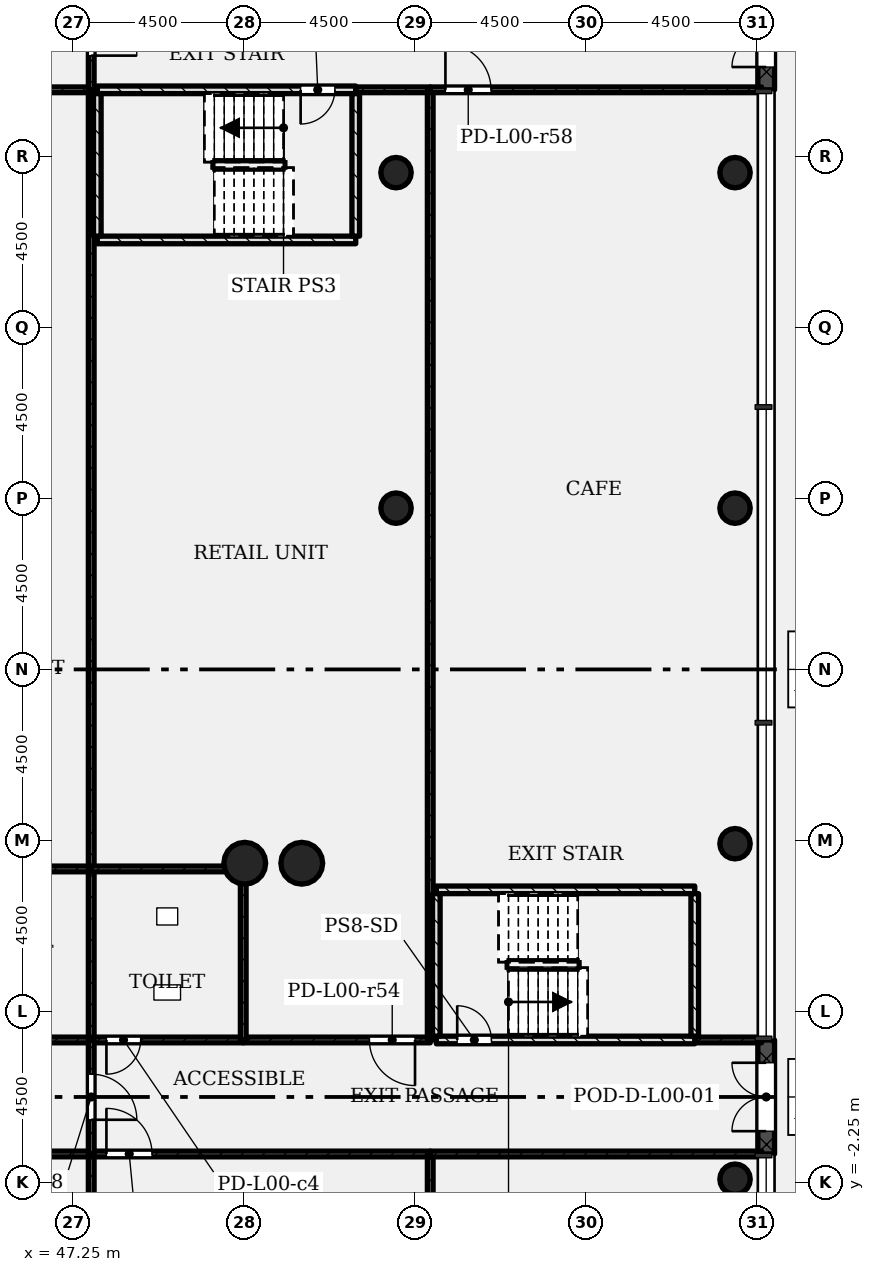
"""IFC4 building model, lengths in metres.
Left out: names, types, materials, properties, quantities, classifications, styles, units other than length and angle.
Written with IfcOpenShell. Run it as: python <this file> out.ifc"""

import sys

from ifc_helpers import new_model, si_unit, direction, frame, frame_2d, origin, origin_2d, place, context, subcontext, project, spatial, rectangle, hollow_circle, extrude, element, fill, save


model = new_model("IFC4")
c1 = context("Model", 3, precision=1e-05, world=origin(), true_north=direction((0.0, 1.0)))
c2 = subcontext(c1, "Body", "Model", "MODEL_VIEW")
j1 = project(units=[si_unit("LENGTHUNIT", "METRE"), si_unit("PLANEANGLEUNIT", "RADIAN")], contexts=[c1])
p1 = place(None, origin())
s1 = spatial("IfcSite", under=j1, at=p1, CompositionType="ELEMENT")
p2 = place(p1, origin())
s2 = spatial("IfcBuilding", under=s1, at=p2, CompositionType="ELEMENT")
p3 = place(p2, origin())
s3 = spatial("IfcBuildingStorey", under=s2, at=p3, CompositionType="ELEMENT", Elevation=0.0)
for number, where, z_axis, x_axis in (
    (1, (51.75, 6.15, -0.4), (0.0, 0.0, 1.0), (1.0, 0.0, 0.0)),
    (2, (53.25, 6.15, -0.4), (0.0, 0.0, 1.0), (1.0, 0.0, 0.0)),
):
    element("IfcColumn", number, at=place(p3, frame(where, z_axis=z_axis, x_axis=x_axis)), inside=s3, PredefinedType="COLUMN", context=c2, shape_type="SweptSolid", body=[
        extrude(hollow_circle(Radius=0.55, WallThickness=0.04, at=origin_2d()), origin(), (0.0, 0.0, 1.0), 6.4),
    ])
for number, where, z_axis, x_axis in (
    (3, (64.65, -2.164, -0.4), (0.0, 0.0, 1.0), (1.0, 0.0, 0.0)),
    (4, (64.65, 6.664, -0.4), (0.0, 0.0, 1.0), (1.0, 0.0, 0.0)),
    (5, (55.73, 15.493, -0.4), (0.0, 0.0, 1.0), (1.0, 0.0, 0.0)),
    (6, (64.65, 15.493, -0.4), (0.0, 0.0, 1.0), (1.0, 0.0, 0.0)),
    (7, (55.73, 24.321, -0.4), (0.0, 0.0, 1.0), (1.0, 0.0, 0.0)),
    (8, (64.65, 24.321, -0.4), (0.0, 0.0, 1.0), (1.0, 0.0, 0.0)),
):
    element("IfcColumn", number, at=place(p3, frame(where, z_axis=z_axis, x_axis=x_axis)), inside=s3, PredefinedType="COLUMN", context=c2, shape_type="SweptSolid", body=[
        extrude(hollow_circle(Radius=0.4, WallThickness=0.028, at=origin_2d()), origin(), (0.0, 0.0, 1.0), 6.4),
    ])
p4 = place(p3, frame((65.47, -1.5, 0.0), z_axis=(0.0, 0.0, 1.0), x_axis=(0.0, 1.0, 0.0)))
e9 = element("IfcWall", 9, at=p4, inside=s3, PredefinedType="STANDARD", context=c2, shape_type="SweptSolid", body=[
    extrude(rectangle(XDim=3.0, YDim=0.44, at=frame_2d((1.5, 0.0))), origin(), (0.0, 0.0, 1.0), 5.7),
])
p5 = place(p4, frame((0.6, 0.0, 0.0)))
e10 = element("IfcOpeningElement", 10, at=p5, cuts=e9, PredefinedType="OPENING", context=c2, shape_type="SweptSolid", body=[
    extrude(rectangle(XDim=1.8, YDim=2.1, at=frame_2d((0.9, 1.05))), frame((0.0, 0.23, 0.0), z_axis=(0.0, -1.0, 0.0), x_axis=(1.0, 0.0, 0.0)), (0.0, 0.0, 1.0), 0.46),
])
p6 = place(p3, frame((65.47, 26.5, 0.0), z_axis=(0.0, 0.0, 1.0), x_axis=(0.0, 1.0, 0.0)))
e11 = element("IfcWall", 11, at=p6, inside=s3, PredefinedType="STANDARD", context=c2, shape_type="SweptSolid", body=[
    extrude(rectangle(XDim=3.0, YDim=0.44, at=frame_2d((1.5, 0.0))), origin(), (0.0, 0.0, 1.0), 5.7),
])
p7 = place(p6, frame((0.6, 0.0, 0.0)))
e12 = element("IfcOpeningElement", 12, at=p7, cuts=e11, PredefinedType="OPENING", context=c2, shape_type="SweptSolid", body=[
    extrude(rectangle(XDim=1.8, YDim=2.1, at=frame_2d((0.9, 1.05))), frame((0.0, 0.23, 0.0), z_axis=(0.0, -1.0, 0.0), x_axis=(1.0, 0.0, 0.0)), (0.0, 0.0, 1.0), 0.46),
])
p8 = place(p3, frame((38.79, 26.5, 0.0), z_axis=(0.0, 0.0, 1.0), x_axis=(1.0, 0.0, 0.0)))
e13 = element("IfcWall", 13, at=p8, inside=s3, PredefinedType="PARTITIONING", context=c2, shape_type="SweptSolid", body=[
    extrude(rectangle(XDim=8.92, YDim=0.15, at=frame_2d((4.46, 0.0))), origin(), (0.0, 0.0, 1.0), 5.58),
])
p9 = place(p8, frame((0.4, 0.0, 0.0)))
e14 = element("IfcOpeningElement", 14, at=p9, cuts=e13, PredefinedType="OPENING", context=c2, shape_type="SweptSolid", body=[
    extrude(rectangle(XDim=1.2, YDim=2.1, at=frame_2d((0.6, 1.05))), frame((0.0, 0.085, 0.0), z_axis=(0.0, -1.0, 0.0), x_axis=(1.0, 0.0, 0.0)), (0.0, 0.0, 1.0), 0.17),
])
p10 = place(p3, frame((47.71, 26.5, 0.0), z_axis=(0.0, 0.0, 1.0), x_axis=(0.0, -1.0, 0.0)))
e15 = element("IfcWall", 15, at=p10, inside=s3, PredefinedType="PARTITIONING", context=c2, shape_type="SweptSolid", body=[
    extrude(rectangle(XDim=20.5, YDim=0.15, at=frame_2d((10.25, 0.0))), origin(), (0.0, 0.0, 1.0), 5.58),
])
p11 = place(p3, frame((42.75, -1.5, 0.0), z_axis=(0.0, 0.0, 1.0), x_axis=(1.0, 0.0, 0.0)))
e16 = element("IfcWall", 16, at=p11, inside=s3, PredefinedType="PARTITIONING", context=c2, shape_type="SweptSolid", body=[
    extrude(rectangle(XDim=4.96, YDim=0.15, at=frame_2d((2.48, 0.0))), origin(), (0.0, 0.0, 1.0), 5.58),
])
p12 = place(p3, frame((47.71, -1.5, 0.0), z_axis=(0.0, 0.0, 1.0), x_axis=(0.0, -1.0, 0.0)))
e17 = element("IfcWall", 17, at=p12, inside=s3, PredefinedType="PARTITIONING", context=c2, shape_type="SweptSolid", body=[
    extrude(rectangle(XDim=22.0, YDim=0.15, at=frame_2d((11.0, 0.0))), origin(), (0.0, 0.0, 1.0), 5.58),
])
p13 = place(p3, frame((47.71, -1.5, 0.0), z_axis=(0.0, 0.0, 1.0), x_axis=(1.0, 0.0, 0.0)))
e18 = element("IfcWall", 18, at=p13, inside=s3, PredefinedType="PARTITIONING", context=c2, shape_type="SweptSolid", body=[
    extrude(rectangle(XDim=8.92, YDim=0.15, at=frame_2d((4.46, 0.0))), origin(), (0.0, 0.0, 1.0), 5.58),
])
p14 = place(p13, frame((0.4, 0.0, 0.0)))
e19 = element("IfcOpeningElement", 19, at=p14, cuts=e18, PredefinedType="OPENING", context=c2, shape_type="SweptSolid", body=[
    extrude(rectangle(XDim=1.2, YDim=2.1, at=frame_2d((0.6, 1.05))), frame((0.0, 0.085, 0.0), z_axis=(0.0, -1.0, 0.0), x_axis=(1.0, 0.0, 0.0)), (0.0, 0.0, 1.0), 0.17),
])
p15 = place(p3, frame((56.63, -1.5, 0.0), z_axis=(0.0, 0.0, 1.0), x_axis=(0.0, -1.0, 0.0)))
e20 = element("IfcWall", 20, at=p15, inside=s3, PredefinedType="PARTITIONING", context=c2, shape_type="SweptSolid", body=[
    extrude(rectangle(XDim=22.0, YDim=0.15, at=frame_2d((11.0, 0.0))), origin(), (0.0, 0.0, 1.0), 5.58),
])
p16 = place(p3, frame((54.67, 26.5, 0.0), z_axis=(0.0, 0.0, 1.0), x_axis=(1.0, 0.0, 0.0)))
e21 = element("IfcWall", 21, at=p16, inside=s3, PredefinedType="PARTITIONING", context=c2, shape_type="SweptSolid", body=[
    extrude(rectangle(XDim=1.96, YDim=0.15, at=frame_2d((0.98, 0.0))), origin(), (0.0, 0.0, 1.0), 5.58),
])
p17 = place(p3, frame((56.63, 1.5, 0.0), z_axis=(0.0, 0.0, 1.0), x_axis=(-1.0, 0.0, 0.0)))
e22 = element("IfcWall", 22, at=p17, inside=s3, PredefinedType="PARTITIONING", context=c2, shape_type="SweptSolid", body=[
    extrude(rectangle(XDim=4.92, YDim=0.15, at=frame_2d((2.46, 0.0))), origin(), (0.0, 0.0, 1.0), 5.58),
])
p18 = place(p17, frame((0.4, 0.0, 0.0)))
e23 = element("IfcOpeningElement", 23, at=p18, cuts=e22, PredefinedType="OPENING", context=c2, shape_type="SweptSolid", body=[
    extrude(rectangle(XDim=1.2, YDim=2.1, at=frame_2d((0.6, 1.05))), frame((0.0, 0.085, 0.0), z_axis=(0.0, -1.0, 0.0), x_axis=(1.0, 0.0, 0.0)), (0.0, 0.0, 1.0), 0.17),
])
p19 = place(p3, frame((56.63, 26.5, 0.0), z_axis=(0.0, 0.0, 1.0), x_axis=(0.0, -1.0, 0.0)))
e24 = element("IfcWall", 24, at=p19, inside=s3, PredefinedType="PARTITIONING", context=c2, shape_type="SweptSolid", body=[
    extrude(rectangle(XDim=25.0, YDim=0.15, at=frame_2d((12.5, 0.0))), origin(), (0.0, 0.0, 1.0), 5.58),
])
p20 = place(p3, frame((56.63, -1.5, 0.0), z_axis=(0.0, 0.0, 1.0), x_axis=(1.0, 0.0, 0.0)))
e25 = element("IfcWall", 25, at=p20, inside=s3, PredefinedType="PARTITIONING", context=c2, shape_type="SweptSolid", body=[
    extrude(rectangle(XDim=8.72, YDim=0.15, at=frame_2d((4.36, 0.0))), origin(), (0.0, 0.0, 1.0), 5.58),
])
p21 = place(p3, frame((56.63, 26.5, 0.0), z_axis=(0.0, 0.0, 1.0), x_axis=(1.0, 0.0, 0.0)))
e26 = element("IfcWall", 26, at=p21, inside=s3, PredefinedType="PARTITIONING", context=c2, shape_type="SweptSolid", body=[
    extrude(rectangle(XDim=8.72, YDim=0.15, at=frame_2d((4.36, 0.0))), origin(), (0.0, 0.0, 1.0), 5.58),
])
p22 = place(p21, frame((0.4, 0.0, 0.0)))
e27 = element("IfcOpeningElement", 27, at=p22, cuts=e26, PredefinedType="OPENING", context=c2, shape_type="SweptSolid", body=[
    extrude(rectangle(XDim=1.2, YDim=2.1, at=frame_2d((0.6, 1.05))), frame((0.0, 0.085, 0.0), z_axis=(0.0, -1.0, 0.0), x_axis=(1.0, 0.0, 0.0)), (0.0, 0.0, 1.0), 0.17),
])
p23 = place(p3, frame((65.35, 1.5, 0.0), z_axis=(0.0, 0.0, 1.0), x_axis=(-1.0, 0.0, 0.0)))
e28 = element("IfcWall", 28, at=p23, inside=s3, PredefinedType="PARTITIONING", context=c2, shape_type="SweptSolid", body=[
    extrude(rectangle(XDim=1.76, YDim=0.15, at=frame_2d((0.88, 0.0))), origin(), (0.0, 0.0, 1.0), 5.58),
])
p24 = place(p3, frame((43.71, 1.5, 0.0), z_axis=(0.0, 0.0, 1.0), x_axis=(1.0, 0.0, 0.0)))
e29 = element("IfcWall", 29, at=p24, inside=s3, PredefinedType="PARTITIONING", context=c2, shape_type="SweptSolid", body=[
    extrude(rectangle(XDim=4.0, YDim=0.15, at=frame_2d((2.0, 0.0))), origin(), (0.0, 0.0, 1.0), 5.58),
])
p25 = place(p24, frame((0.4, 0.0, 0.0)))
e30 = element("IfcOpeningElement", 30, at=p25, cuts=e29, PredefinedType="OPENING", context=c2, shape_type="SweptSolid", body=[
    extrude(rectangle(XDim=0.9, YDim=2.1, at=frame_2d((0.45, 1.05))), frame((0.0, 0.085, 0.0), z_axis=(0.0, -1.0, 0.0), x_axis=(1.0, 0.0, 0.0)), (0.0, 0.0, 1.0), 0.17),
])
p26 = place(p3, frame((47.71, 6.0, 0.0), z_axis=(0.0, 0.0, 1.0), x_axis=(-1.0, 0.0, 0.0)))
e31 = element("IfcWall", 31, at=p26, inside=s3, PredefinedType="PARTITIONING", context=c2, shape_type="SweptSolid", body=[
    extrude(rectangle(XDim=4.0, YDim=0.15, at=frame_2d((2.0, 0.0))), origin(), (0.0, 0.0, 1.0), 5.58),
])
p27 = place(p3, frame((47.71, 1.5, 0.0), z_axis=(0.0, 0.0, 1.0), x_axis=(0.0, 1.0, 0.0)))
e32 = element("IfcWall", 32, at=p27, inside=s3, PredefinedType="PARTITIONING", context=c2, shape_type="SweptSolid", body=[
    extrude(rectangle(XDim=4.5, YDim=0.15, at=frame_2d((2.25, 0.0))), origin(), (0.0, 0.0, 1.0), 5.58),
])
p28 = place(p3, frame((47.71, 1.5, 0.0), z_axis=(0.0, 0.0, 1.0), x_axis=(1.0, 0.0, 0.0)))
e33 = element("IfcWall", 33, at=p28, inside=s3, PredefinedType="PARTITIONING", context=c2, shape_type="SweptSolid", body=[
    extrude(rectangle(XDim=4.0, YDim=0.15, at=frame_2d((2.0, 0.0))), origin(), (0.0, 0.0, 1.0), 5.58),
])
p29 = place(p28, frame((0.4, 0.0, 0.0)))
e34 = element("IfcOpeningElement", 34, at=p29, cuts=e33, PredefinedType="OPENING", context=c2, shape_type="SweptSolid", body=[
    extrude(rectangle(XDim=0.9, YDim=2.1, at=frame_2d((0.45, 1.05))), frame((0.0, 0.085, 0.0), z_axis=(0.0, -1.0, 0.0), x_axis=(1.0, 0.0, 0.0)), (0.0, 0.0, 1.0), 0.17),
])
p30 = place(p3, frame((51.71, 1.5, 0.0), z_axis=(0.0, 0.0, 1.0), x_axis=(0.0, 1.0, 0.0)))
e35 = element("IfcWall", 35, at=p30, inside=s3, PredefinedType="PARTITIONING", context=c2, shape_type="SweptSolid", body=[
    extrude(rectangle(XDim=4.5, YDim=0.15, at=frame_2d((2.25, 0.0))), origin(), (0.0, 0.0, 1.0), 5.58),
])
p31 = place(p3, frame((51.71, 6.0, 0.0), z_axis=(0.0, 0.0, 1.0), x_axis=(-1.0, 0.0, 0.0)))
e36 = element("IfcWall", 36, at=p31, inside=s3, PredefinedType="PARTITIONING", context=c2, shape_type="SweptSolid", body=[
    extrude(rectangle(XDim=4.0, YDim=0.15, at=frame_2d((2.0, 0.0))), origin(), (0.0, 0.0, 1.0), 5.58),
])
p32 = place(p3, frame((47.71, 26.5, 0.0), z_axis=(0.0, 0.0, 1.0), x_axis=(0.0, 1.0, 0.0)))
e37 = element("IfcWall", 37, at=p32, inside=s3, PredefinedType="PARTITIONING", context=c2, shape_type="SweptSolid", body=[
    extrude(rectangle(XDim=3.0, YDim=0.15, at=frame_2d((1.5, 0.0))), origin(), (0.0, 0.0, 1.0), 5.58),
])
p33 = place(p32, frame((0.9, 0.0, 0.0)))
e38 = element("IfcOpeningElement", 38, at=p33, cuts=e37, PredefinedType="OPENING", context=c2, shape_type="SweptSolid", body=[
    extrude(rectangle(XDim=1.2, YDim=2.1, at=frame_2d((0.6, 1.05))), frame((0.0, 0.085, 0.0), z_axis=(0.0, -1.0, 0.0), x_axis=(1.0, 0.0, 0.0)), (0.0, 0.0, 1.0), 0.17),
])
p34 = place(p3, frame((47.71, -1.5, 0.0), z_axis=(0.0, 0.0, 1.0), x_axis=(0.0, 1.0, 0.0)))
e39 = element("IfcWall", 39, at=p34, inside=s3, PredefinedType="PARTITIONING", context=c2, shape_type="SweptSolid", body=[
    extrude(rectangle(XDim=3.0, YDim=0.15, at=frame_2d((1.5, 0.0))), origin(), (0.0, 0.0, 1.0), 5.58),
])
p35 = place(p34, frame((0.9, 0.0, 0.0)))
e40 = element("IfcOpeningElement", 40, at=p35, cuts=e39, PredefinedType="OPENING", context=c2, shape_type="SweptSolid", body=[
    extrude(rectangle(XDim=1.2, YDim=2.1, at=frame_2d((0.6, 1.05))), frame((0.0, 0.085, 0.0), z_axis=(0.0, -1.0, 0.0), x_axis=(1.0, 0.0, 0.0)), (0.0, 0.0, 1.0), 0.17),
])
p36 = place(p3, frame((47.87, 26.5, 0.0), z_axis=(0.0, 0.0, 1.0), x_axis=(1.0, 0.0, 0.0)))
e41 = element("IfcWall", 41, at=p36, inside=s3, PredefinedType="SHEAR", context=c2, shape_type="SweptSolid", body=[
    extrude(rectangle(XDim=6.8, YDim=0.2, at=frame_2d((3.4, 0.0))), origin(), (0.0, 0.0, 1.0), 5.58),
])
p37 = place(p36, frame((5.35, 0.0, 0.0)))
e42 = element("IfcOpeningElement", 42, at=p37, cuts=e41, PredefinedType="OPENING", context=c2, shape_type="SweptSolid", body=[
    extrude(rectangle(XDim=0.9, YDim=2.1, at=frame_2d((0.45, 1.05))), frame((0.0, 0.11, 0.0), z_axis=(0.0, -1.0, 0.0), x_axis=(1.0, 0.0, 0.0)), (0.0, 0.0, 1.0), 0.22),
])
p38 = place(p3, frame((47.87, 22.55, 0.0), z_axis=(0.0, 0.0, 1.0), x_axis=(1.0, 0.0, 0.0)))
e43 = element("IfcWall", 43, at=p38, inside=s3, PredefinedType="SHEAR", context=c2, shape_type="SweptSolid", body=[
    extrude(rectangle(XDim=6.8, YDim=0.2, at=frame_2d((3.4, 0.0))), origin(), (0.0, 0.0, 1.0), 5.58),
])
for number, where, z_axis, x_axis in (
    (44, (47.87, 22.65, 0.0), (0.0, 0.0, 1.0), (0.0, 1.0, 0.0)),
    (45, (54.67, 22.65, 0.0), (0.0, 0.0, 1.0), (0.0, 1.0, 0.0)),
):
    element("IfcWall", number, at=place(p3, frame(where, z_axis=z_axis, x_axis=x_axis)), inside=s3, PredefinedType="SHEAR", context=c2, shape_type="SweptSolid", body=[
        extrude(rectangle(XDim=3.75, YDim=0.2, at=frame_2d((1.875, 0.0))), origin(), (0.0, 0.0, 1.0), 5.58),
    ])
p39 = place(p3, frame((56.79, 1.5, 0.0), z_axis=(0.0, 0.0, 1.0), x_axis=(1.0, 0.0, 0.0)))
e46 = element("IfcWall", 46, at=p39, inside=s3, PredefinedType="SHEAR", context=c2, shape_type="SweptSolid", body=[
    extrude(rectangle(XDim=6.8, YDim=0.2, at=frame_2d((3.4, 0.0))), origin(), (0.0, 0.0, 1.0), 5.58),
])
p40 = place(p39, frame((0.55, 0.0, 0.0)))
e47 = element("IfcOpeningElement", 47, at=p40, cuts=e46, PredefinedType="OPENING", context=c2, shape_type="SweptSolid", body=[
    extrude(rectangle(XDim=0.9, YDim=2.1, at=frame_2d((0.45, 1.05))), frame((0.0, 0.11, 0.0), z_axis=(0.0, -1.0, 0.0), x_axis=(1.0, 0.0, 0.0)), (0.0, 0.0, 1.0), 0.22),
])
p41 = place(p3, frame((56.79, 5.45, 0.0), z_axis=(0.0, 0.0, 1.0), x_axis=(1.0, 0.0, 0.0)))
e48 = element("IfcWall", 48, at=p41, inside=s3, PredefinedType="SHEAR", context=c2, shape_type="SweptSolid", body=[
    extrude(rectangle(XDim=6.8, YDim=0.2, at=frame_2d((3.4, 0.0))), origin(), (0.0, 0.0, 1.0), 5.58),
])
for number, where, z_axis, x_axis in (
    (49, (56.79, 1.6, 0.0), (0.0, 0.0, 1.0), (0.0, 1.0, 0.0)),
    (50, (63.59, 1.6, 0.0), (0.0, 0.0, 1.0), (0.0, 1.0, 0.0)),
):
    element("IfcWall", number, at=place(p3, frame(where, z_axis=z_axis, x_axis=x_axis)), inside=s3, PredefinedType="SHEAR", context=c2, shape_type="SweptSolid", body=[
        extrude(rectangle(XDim=3.75, YDim=0.2, at=frame_2d((1.875, 0.0))), origin(), (0.0, 0.0, 1.0), 5.58),
    ])
p42 = place(p5, origin())
e51 = element("IfcDoor", 51, at=p42, inside=s3, OperationType="DOUBLE_DOOR_DOUBLE_SWING", PredefinedType="DOOR", context=c2, shape_type="SweptSolid", body=[
    extrude(rectangle(XDim=1.8, YDim=2.1, at=frame_2d((0.9, 1.05))), frame((0.0, 0.025, 0.0), z_axis=(0.0, -1.0, 0.0), x_axis=(1.0, 0.0, 0.0)), (0.0, 0.0, 1.0), 0.05),
])
fill(e10, e51)
p43 = place(p7, origin())
e52 = element("IfcDoor", 52, at=p43, inside=s3, OperationType="DOUBLE_DOOR_DOUBLE_SWING", PredefinedType="DOOR", context=c2, shape_type="SweptSolid", body=[
    extrude(rectangle(XDim=1.8, YDim=2.1, at=frame_2d((0.9, 1.05))), frame((0.0, 0.025, 0.0), z_axis=(0.0, -1.0, 0.0), x_axis=(1.0, 0.0, 0.0)), (0.0, 0.0, 1.0), 0.05),
])
fill(e12, e52)
p44 = place(p14, origin())
e53 = element("IfcDoor", 53, at=p44, inside=s3, OperationType="SINGLE_SWING_RIGHT", PredefinedType="DOOR", context=c2, shape_type="SweptSolid", body=[
    extrude(rectangle(XDim=1.2, YDim=2.1, at=frame_2d((0.6, 1.05))), frame((0.0, 0.025, 0.0), z_axis=(0.0, -1.0, 0.0), x_axis=(1.0, 0.0, 0.0)), (0.0, 0.0, 1.0), 0.05),
])
fill(e19, e53)
p45 = place(p18, origin())
e54 = element("IfcDoor", 54, at=p45, inside=s3, OperationType="SINGLE_SWING_RIGHT", PredefinedType="DOOR", context=c2, shape_type="SweptSolid", body=[
    extrude(rectangle(XDim=1.2, YDim=2.1, at=frame_2d((0.6, 1.05))), frame((0.0, 0.025, 0.0), z_axis=(0.0, -1.0, 0.0), x_axis=(1.0, 0.0, 0.0)), (0.0, 0.0, 1.0), 0.05),
])
fill(e23, e54)
p46 = place(p22, origin())
e55 = element("IfcDoor", 55, at=p46, inside=s3, OperationType="SINGLE_SWING_RIGHT", PredefinedType="DOOR", context=c2, shape_type="SweptSolid", body=[
    extrude(rectangle(XDim=1.2, YDim=2.1, at=frame_2d((0.6, 1.05))), frame((0.0, 0.025, 0.0), z_axis=(0.0, -1.0, 0.0), x_axis=(1.0, 0.0, 0.0)), (0.0, 0.0, 1.0), 0.05),
])
fill(e27, e55)
p47 = place(p29, origin())
e56 = element("IfcDoor", 56, at=p47, inside=s3, OperationType="SINGLE_SWING_LEFT", PredefinedType="DOOR", context=c2, shape_type="SweptSolid", body=[
    extrude(rectangle(XDim=0.9, YDim=2.1, at=frame_2d((0.45, 1.05))), frame((0.0, 0.025, 0.0), z_axis=(0.0, -1.0, 0.0), x_axis=(1.0, 0.0, 0.0)), (0.0, 0.0, 1.0), 0.05),
])
fill(e34, e56)
p48 = place(p33, origin())
e57 = element("IfcDoor", 57, at=p48, inside=s3, OperationType="SINGLE_SWING_LEFT", PredefinedType="DOOR", context=c2, shape_type="SweptSolid", body=[
    extrude(rectangle(XDim=1.2, YDim=2.1, at=frame_2d((0.6, 1.05))), frame((0.0, 0.025, 0.0), z_axis=(0.0, -1.0, 0.0), x_axis=(1.0, 0.0, 0.0)), (0.0, 0.0, 1.0), 0.05),
])
fill(e38, e57)
p49 = place(p35, origin())
e58 = element("IfcDoor", 58, at=p49, inside=s3, OperationType="SINGLE_SWING_LEFT", PredefinedType="DOOR", context=c2, shape_type="SweptSolid", body=[
    extrude(rectangle(XDim=1.2, YDim=2.1, at=frame_2d((0.6, 1.05))), frame((0.0, 0.025, 0.0), z_axis=(0.0, -1.0, 0.0), x_axis=(1.0, 0.0, 0.0)), (0.0, 0.0, 1.0), 0.05),
])
fill(e40, e58)
p50 = place(p37, origin())
e59 = element("IfcDoor", 59, at=p50, inside=s3, OperationType="SINGLE_SWING_LEFT", PredefinedType="DOOR", context=c2, shape_type="SweptSolid", body=[
    extrude(rectangle(XDim=0.9, YDim=2.1, at=frame_2d((0.45, 1.05))), frame((0.0, 0.025, 0.0), z_axis=(0.0, -1.0, 0.0), x_axis=(1.0, 0.0, 0.0)), (0.0, 0.0, 1.0), 0.05),
])
fill(e42, e59)
p51 = place(p40, origin())
e60 = element("IfcDoor", 60, at=p51, inside=s3, OperationType="SINGLE_SWING_RIGHT", PredefinedType="DOOR", context=c2, shape_type="SweptSolid", body=[
    extrude(rectangle(XDim=0.9, YDim=2.1, at=frame_2d((0.45, 1.05))), frame((0.0, 0.025, 0.0), z_axis=(0.0, -1.0, 0.0), x_axis=(1.0, 0.0, 0.0)), (0.0, 0.0, 1.0), 0.05),
])
fill(e47, e60)
save(model, sys.argv[1])
